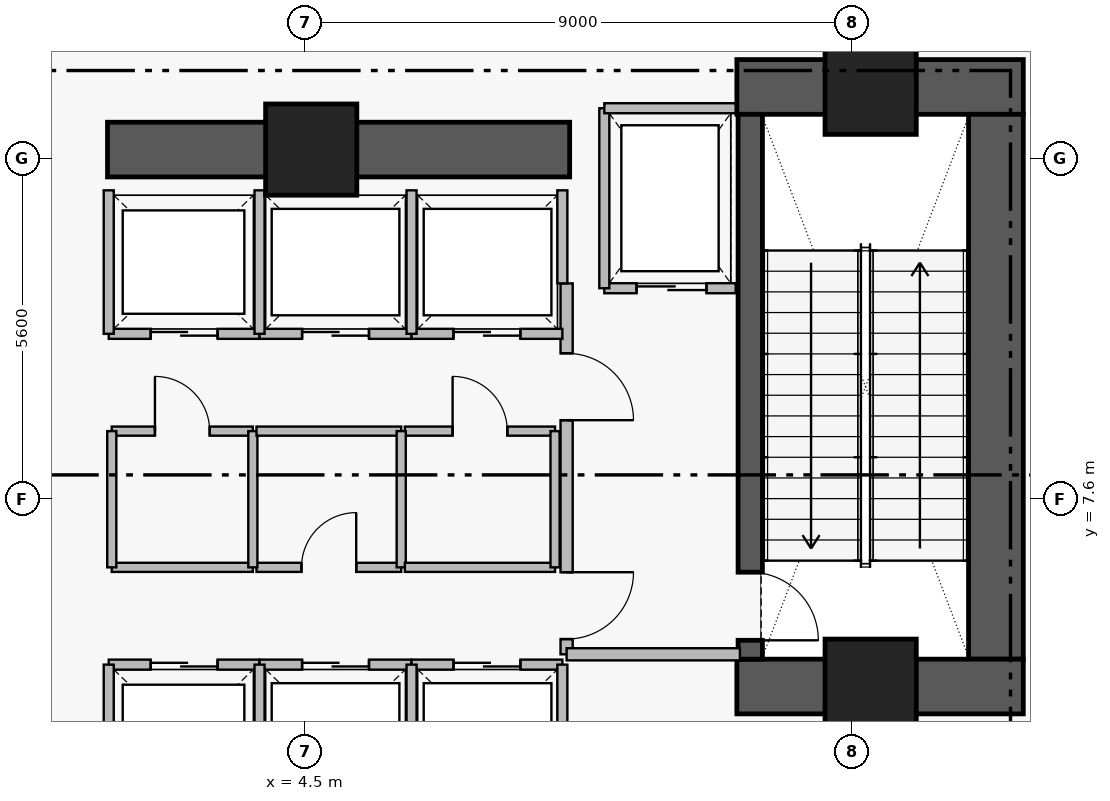
"""IFC4 building model, lengths in metres.
Left out: names, types, materials, properties, quantities, classifications, styles, units other than length and angle.
Written with IfcOpenShell. Run it as: python <this file> out.ifc"""

import sys

from ifc_helpers import new_model, si_unit, direction, frame, frame_2d, origin, origin_2d, place, context, subcontext, project, spatial, rectangle, extrude, element, fill, save


model = new_model("IFC4")
c1 = context("Model", 3, precision=1e-05, world=origin(), true_north=direction((0.0, 1.0)))
c2 = subcontext(c1, "Body", "Model", "MODEL_VIEW")
j1 = project(units=[si_unit("LENGTHUNIT", "METRE"), si_unit("PLANEANGLEUNIT", "RADIAN")], contexts=[c1])
p1 = place(None, origin())
s1 = spatial("IfcSite", under=j1, at=p1, CompositionType="ELEMENT")
p2 = place(p1, origin())
s2 = spatial("IfcBuilding", under=s1, at=p2, CompositionType="ELEMENT")
p3 = place(p2, origin())
s3 = spatial("IfcBuildingStorey", under=s2, at=p3, CompositionType="ELEMENT", Elevation=0.0)
p4 = place(p3, frame((11.6, 14.38, 0.0), z_axis=(0.0, 0.0, 1.0), x_axis=(1.0, 0.0, 0.0)))
e1 = element("IfcWall", 1, at=p4, inside=s3, PredefinedType="SHEAR", context=c2, shape_type="SweptSolid", body=[
    extrude(rectangle(XDim=4.71, YDim=0.9, at=frame_2d((2.355, 0.0))), origin(), (0.0, 0.0, 1.0), 5.81),
])
p5 = place(p3, frame((15.86, 4.97, 0.0), z_axis=(0.0, 0.0, 1.0), x_axis=(0.0, 1.0, 0.0)))
e2 = element("IfcWall", 2, at=p5, inside=s3, PredefinedType="SHEAR", context=c2, shape_type="SweptSolid", body=[
    extrude(rectangle(XDim=8.96, YDim=0.9, at=frame_2d((4.48, 0.0))), origin(), (0.0, 0.0, 1.0), 5.81),
])
p6 = place(p3, frame((11.6, 4.52, 0.0), z_axis=(0.0, 0.0, 1.0), x_axis=(1.0, 0.0, 0.0)))
e3 = element("IfcWall", 3, at=p6, inside=s3, PredefinedType="SHEAR", context=c2, shape_type="SweptSolid", body=[
    extrude(rectangle(XDim=4.71, YDim=0.9, at=frame_2d((2.355, 0.0))), origin(), (0.0, 0.0, 1.0), 5.81),
])
p7 = place(p3, frame((1.25, 13.35, 0.0), z_axis=(0.0, 0.0, 1.0), x_axis=(1.0, 0.0, 0.0)))
e4 = element("IfcWall", 4, at=p7, inside=s3, PredefinedType="SHEAR", context=c2, shape_type="SweptSolid", body=[
    extrude(rectangle(XDim=7.6, YDim=0.9, at=frame_2d((3.8, 0.0))), origin(), (0.0, 0.0, 1.0), 5.75),
])
p8 = place(p3, frame((11.82, 13.93, 0.0), z_axis=(0.0, 0.0, 1.0), x_axis=(0.0, -1.0, 0.0)))
e5 = element("IfcWall", 5, at=p8, inside=s3, PredefinedType="SHEAR", context=c2, shape_type="SweptSolid", body=[
    extrude(rectangle(XDim=8.96, YDim=0.4, at=frame_2d((4.48, 0.0))), origin(), (0.0, 0.0, 1.0), 5.81),
])
p9 = place(p8, frame((7.53, 0.0, 0.0)))
e6 = element("IfcOpeningElement", 6, at=p9, cuts=e5, PredefinedType="OPENING", context=c2, shape_type="SweptSolid", body=[
    extrude(rectangle(XDim=1.12, YDim=2.22, at=frame_2d((0.56, 1.11))), frame((0.0, 0.21, 0.0), z_axis=(0.0, -1.0, 0.0), x_axis=(1.0, 0.0, 0.0)), (0.0, 0.0, 1.0), 0.42),
])
for number, where, z_axis, x_axis in (
    (7, (4.6, 13.35, 0.0), (0.0, 0.0, 1.0), (1.0, 0.0, 0.0)),
    (8, (13.8, 14.35, 0.0), (0.0, 0.0, 1.0), (1.0, 0.0, 0.0)),
    (9, (13.8, 4.55, 0.0), (0.0, 0.0, 1.0), (1.0, 0.0, 0.0)),
):
    element("IfcColumn", number, at=place(p3, frame(where, z_axis=z_axis, x_axis=x_axis)), inside=s3, PredefinedType="COLUMN", context=c2, shape_type="SweptSolid", body=[
        extrude(rectangle(XDim=1.5, YDim=1.5, at=origin_2d()), origin(), (0.0, 0.0, 1.0), 6.0),
    ])
p10 = place(p3, frame((8.8, 11.15, 0.0), z_axis=(0.0, 0.0, 1.0), x_axis=(0.0, -1.0, 0.0)))
e10 = element("IfcWall", 10, at=p10, inside=s3, PredefinedType="PARTITIONING", context=c2, shape_type="SweptSolid", body=[
    extrude(rectangle(XDim=6.1, YDim=0.2, at=frame_2d((3.05, 0.0))), origin(), (0.0, 0.0, 1.0), 5.75),
])
p11 = place(p10, frame((1.15, 0.0, 0.0)))
e11 = element("IfcOpeningElement", 11, at=p11, cuts=e10, PredefinedType="OPENING", context=c2, shape_type="SweptSolid", body=[
    extrude(rectangle(XDim=1.1, YDim=2.2, at=frame_2d((0.55, 1.1))), frame((0.0, 0.11, 0.0), z_axis=(0.0, -1.0, 0.0), x_axis=(1.0, 0.0, 0.0)), (0.0, 0.0, 1.0), 0.22),
])
p12 = place(p10, frame((4.75, 0.0, 0.0)))
e12 = element("IfcOpeningElement", 12, at=p12, cuts=e10, PredefinedType="OPENING", context=c2, shape_type="SweptSolid", body=[
    extrude(rectangle(XDim=1.1, YDim=2.2, at=frame_2d((0.55, 1.1))), frame((0.0, 0.11, 0.0), z_axis=(0.0, -1.0, 0.0), x_axis=(1.0, 0.0, 0.0)), (0.0, 0.0, 1.0), 0.22),
])
p13 = place(p3, frame((9.42, 11.07, 0.0), z_axis=(0.0, 0.0, 1.0), x_axis=(1.0, 0.0, 0.0)))
e13 = element("IfcWall", 13, at=p13, inside=s3, PredefinedType="PARTITIONING", context=c2, shape_type="SweptSolid", body=[
    extrude(rectangle(XDim=2.16, YDim=0.165, at=frame_2d((1.08, 0.0))), origin(), (0.0, 0.0, 1.0), 5.75),
])
p14 = place(p13, frame((0.53, 0.0, 0.0)))
e14 = element("IfcOpeningElement", 14, at=p14, cuts=e13, PredefinedType="OPENING", context=c2, shape_type="SweptSolid", body=[
    extrude(rectangle(XDim=1.15, YDim=2.25, at=frame_2d((0.575, 1.125))), frame((0.0, 0.093, 0.0), z_axis=(0.0, -1.0, 0.0), x_axis=(1.0, 0.0, 0.0)), (0.0, 0.0, 1.0), 0.185),
])
p15 = place(p3, frame((1.27, 4.88, 0.0), z_axis=(0.0, 0.0, 1.0), x_axis=(1.0, 0.0, 0.0)))
e15 = element("IfcWall", 15, at=p15, inside=s3, PredefinedType="PARTITIONING", context=c2, shape_type="SweptSolid", body=[
    extrude(rectangle(XDim=2.48, YDim=0.165, at=frame_2d((1.24, 0.0))), origin(), (0.0, 0.0, 1.0), 5.75),
])
p16 = place(p15, frame((0.69, 0.0, 0.0)))
e16 = element("IfcOpeningElement", 16, at=p16, cuts=e15, PredefinedType="OPENING", context=c2, shape_type="SweptSolid", body=[
    extrude(rectangle(XDim=1.1, YDim=2.25, at=frame_2d((0.55, 1.125))), frame((0.0, 0.093, 0.0), z_axis=(0.0, -1.0, 0.0), x_axis=(1.0, 0.0, 0.0)), (0.0, 0.0, 1.0), 0.185),
])
p17 = place(p3, frame((1.27, 10.32, 0.0), z_axis=(0.0, 0.0, 1.0), x_axis=(1.0, 0.0, 0.0)))
e17 = element("IfcWall", 17, at=p17, inside=s3, PredefinedType="PARTITIONING", context=c2, shape_type="SweptSolid", body=[
    extrude(rectangle(XDim=2.48, YDim=0.165, at=frame_2d((1.24, 0.0))), origin(), (0.0, 0.0, 1.0), 5.75),
])
p18 = place(p17, frame((0.69, 0.0, 0.0)))
e18 = element("IfcOpeningElement", 18, at=p18, cuts=e17, PredefinedType="OPENING", context=c2, shape_type="SweptSolid", body=[
    extrude(rectangle(XDim=1.1, YDim=2.25, at=frame_2d((0.55, 1.125))), frame((0.0, 0.093, 0.0), z_axis=(0.0, -1.0, 0.0), x_axis=(1.0, 0.0, 0.0)), (0.0, 0.0, 1.0), 0.185),
])
p19 = place(p3, frame((3.75, 4.88, 0.0), z_axis=(0.0, 0.0, 1.0), x_axis=(1.0, 0.0, 0.0)))
e19 = element("IfcWall", 19, at=p19, inside=s3, PredefinedType="PARTITIONING", context=c2, shape_type="SweptSolid", body=[
    extrude(rectangle(XDim=2.5, YDim=0.165, at=frame_2d((1.25, 0.0))), origin(), (0.0, 0.0, 1.0), 5.75),
])
p20 = place(p19, frame((0.7, 0.0, 0.0)))
e20 = element("IfcOpeningElement", 20, at=p20, cuts=e19, PredefinedType="OPENING", context=c2, shape_type="SweptSolid", body=[
    extrude(rectangle(XDim=1.1, YDim=2.25, at=frame_2d((0.55, 1.125))), frame((0.0, 0.093, 0.0), z_axis=(0.0, -1.0, 0.0), x_axis=(1.0, 0.0, 0.0)), (0.0, 0.0, 1.0), 0.185),
])
p21 = place(p3, frame((6.25, 4.88, 0.0), z_axis=(0.0, 0.0, 1.0), x_axis=(1.0, 0.0, 0.0)))
e21 = element("IfcWall", 21, at=p21, inside=s3, PredefinedType="PARTITIONING", context=c2, shape_type="SweptSolid", body=[
    extrude(rectangle(XDim=2.48, YDim=0.165, at=frame_2d((1.24, 0.0))), origin(), (0.0, 0.0, 1.0), 5.75),
])
p22 = place(p21, frame((0.69, 0.0, 0.0)))
e22 = element("IfcOpeningElement", 22, at=p22, cuts=e21, PredefinedType="OPENING", context=c2, shape_type="SweptSolid", body=[
    extrude(rectangle(XDim=1.1, YDim=2.25, at=frame_2d((0.55, 1.125))), frame((0.0, 0.093, 0.0), z_axis=(0.0, -1.0, 0.0), x_axis=(1.0, 0.0, 0.0)), (0.0, 0.0, 1.0), 0.185),
])
p23 = place(p3, frame((3.75, 10.32, 0.0), z_axis=(0.0, 0.0, 1.0), x_axis=(1.0, 0.0, 0.0)))
e23 = element("IfcWall", 23, at=p23, inside=s3, PredefinedType="PARTITIONING", context=c2, shape_type="SweptSolid", body=[
    extrude(rectangle(XDim=2.5, YDim=0.165, at=frame_2d((1.25, 0.0))), origin(), (0.0, 0.0, 1.0), 5.75),
])
p24 = place(p23, frame((0.7, 0.0, 0.0)))
e24 = element("IfcOpeningElement", 24, at=p24, cuts=e23, PredefinedType="OPENING", context=c2, shape_type="SweptSolid", body=[
    extrude(rectangle(XDim=1.1, YDim=2.25, at=frame_2d((0.55, 1.125))), frame((0.0, 0.093, 0.0), z_axis=(0.0, -1.0, 0.0), x_axis=(1.0, 0.0, 0.0)), (0.0, 0.0, 1.0), 0.185),
])
p25 = place(p3, frame((6.25, 10.32, 0.0), z_axis=(0.0, 0.0, 1.0), x_axis=(1.0, 0.0, 0.0)))
e25 = element("IfcWall", 25, at=p25, inside=s3, PredefinedType="PARTITIONING", context=c2, shape_type="SweptSolid", body=[
    extrude(rectangle(XDim=2.48, YDim=0.165, at=frame_2d((1.24, 0.0))), origin(), (0.0, 0.0, 1.0), 5.75),
])
p26 = place(p25, frame((0.69, 0.0, 0.0)))
e26 = element("IfcOpeningElement", 26, at=p26, cuts=e25, PredefinedType="OPENING", context=c2, shape_type="SweptSolid", body=[
    extrude(rectangle(XDim=1.1, YDim=2.25, at=frame_2d((0.55, 1.125))), frame((0.0, 0.093, 0.0), z_axis=(0.0, -1.0, 0.0), x_axis=(1.0, 0.0, 0.0)), (0.0, 0.0, 1.0), 0.185),
])
p27 = place(p3, frame((1.32, 8.72, 0.0), z_axis=(0.0, 0.0, 1.0), x_axis=(1.0, 0.0, 0.0)))
e27 = element("IfcWall", 27, at=p27, inside=s3, PredefinedType="PARTITIONING", context=c2, shape_type="SweptSolid", body=[
    extrude(rectangle(XDim=2.32, YDim=0.15, at=frame_2d((1.16, 0.0))), origin(), (0.0, 0.0, 1.0), 5.75),
])
p28 = place(p27, frame((0.71, 0.0, 0.0)))
e28 = element("IfcOpeningElement", 28, at=p28, cuts=e27, PredefinedType="OPENING", context=c2, shape_type="SweptSolid", body=[
    extrude(rectangle(XDim=0.9, YDim=2.15, at=frame_2d((0.45, 1.075))), frame((0.0, 0.085, 0.0), z_axis=(0.0, -1.0, 0.0), x_axis=(1.0, 0.0, 0.0)), (0.0, 0.0, 1.0), 0.17),
])
p29 = place(p3, frame((3.7, 6.48, 0.0), z_axis=(0.0, 0.0, 1.0), x_axis=(1.0, 0.0, 0.0)))
e29 = element("IfcWall", 29, at=p29, inside=s3, PredefinedType="PARTITIONING", context=c2, shape_type="SweptSolid", body=[
    extrude(rectangle(XDim=2.38, YDim=0.15, at=frame_2d((1.19, 0.0))), origin(), (0.0, 0.0, 1.0), 5.75),
])
p30 = place(p29, frame((0.74, 0.0, 0.0)))
e30 = element("IfcOpeningElement", 30, at=p30, cuts=e29, PredefinedType="OPENING", context=c2, shape_type="SweptSolid", body=[
    extrude(rectangle(XDim=0.9, YDim=2.15, at=frame_2d((0.45, 1.075))), frame((0.0, 0.085, 0.0), z_axis=(0.0, -1.0, 0.0), x_axis=(1.0, 0.0, 0.0)), (0.0, 0.0, 1.0), 0.17),
])
p31 = place(p3, frame((6.14, 8.72, 0.0), z_axis=(0.0, 0.0, 1.0), x_axis=(1.0, 0.0, 0.0)))
e31 = element("IfcWall", 31, at=p31, inside=s3, PredefinedType="PARTITIONING", context=c2, shape_type="SweptSolid", body=[
    extrude(rectangle(XDim=2.47, YDim=0.15, at=frame_2d((1.235, 0.0))), origin(), (0.0, 0.0, 1.0), 5.75),
])
p32 = place(p31, frame((0.785, 0.0, 0.0)))
e32 = element("IfcOpeningElement", 32, at=p32, cuts=e31, PredefinedType="OPENING", context=c2, shape_type="SweptSolid", body=[
    extrude(rectangle(XDim=0.9, YDim=2.15, at=frame_2d((0.45, 1.075))), frame((0.0, 0.085, 0.0), z_axis=(0.0, -1.0, 0.0), x_axis=(1.0, 0.0, 0.0)), (0.0, 0.0, 1.0), 0.17),
])
p33 = place(p3, frame((8.8, 5.05, 0.0), z_axis=(0.0, 0.0, 1.0), x_axis=(1.0, 0.0, 0.0)))
e33 = element("IfcWall", 33, at=p33, inside=s3, PredefinedType="PARTITIONING", context=c2, shape_type="SweptSolid", body=[
    extrude(rectangle(XDim=2.85, YDim=0.2, at=frame_2d((1.425, 0.0))), origin(), (0.0, 0.0, 1.0), 5.75),
])
p34 = place(p3, frame((9.42, 11.07, 0.0), z_axis=(0.0, 0.0, 1.0), x_axis=(0.0, 1.0, 0.0)))
e34 = element("IfcWall", 34, at=p34, inside=s3, PredefinedType="PARTITIONING", context=c2, shape_type="SweptSolid", body=[
    extrude(rectangle(XDim=2.96, YDim=0.165, at=frame_2d((1.48, 0.0))), origin(), (0.0, 0.0, 1.0), 5.75),
])
p35 = place(p3, frame((9.42, 14.03, 0.0), z_axis=(0.0, 0.0, 1.0), x_axis=(1.0, 0.0, 0.0)))
e35 = element("IfcWall", 35, at=p35, inside=s3, PredefinedType="PARTITIONING", context=c2, shape_type="SweptSolid", body=[
    extrude(rectangle(XDim=2.16, YDim=0.165, at=frame_2d((1.08, 0.0))), origin(), (0.0, 0.0, 1.0), 5.75),
])
for number, where, z_axis, x_axis in (
    (36, (1.27, 2.52, 0.0), (0.0, 0.0, 1.0), (0.0, 1.0, 0.0)),
    (37, (3.75, 2.52, 0.0), (0.0, 0.0, 1.0), (0.0, 1.0, 0.0)),
    (38, (1.27, 10.32, 0.0), (0.0, 0.0, 1.0), (0.0, 1.0, 0.0)),
    (39, (3.75, 10.32, 0.0), (0.0, 0.0, 1.0), (0.0, 1.0, 0.0)),
    (40, (6.25, 2.52, 0.0), (0.0, 0.0, 1.0), (0.0, 1.0, 0.0)),
    (41, (8.73, 2.52, 0.0), (0.0, 0.0, 1.0), (0.0, 1.0, 0.0)),
    (42, (6.25, 10.32, 0.0), (0.0, 0.0, 1.0), (0.0, 1.0, 0.0)),
):
    element("IfcWall", number, at=place(p3, frame(where, z_axis=z_axis, x_axis=x_axis)), inside=s3, PredefinedType="PARTITIONING", context=c2, shape_type="SweptSolid", body=[
        extrude(rectangle(XDim=2.36, YDim=0.165, at=frame_2d((1.18, 0.0))), origin(), (0.0, 0.0, 1.0), 5.75),
    ])
p36 = place(p3, frame((8.73, 11.15, 0.0), z_axis=(0.0, 0.0, 1.0), x_axis=(0.0, 1.0, 0.0)))
e43 = element("IfcWall", 43, at=p36, inside=s3, PredefinedType="PARTITIONING", context=c2, shape_type="SweptSolid", body=[
    extrude(rectangle(XDim=1.53, YDim=0.165, at=frame_2d((0.765, 0.0))), origin(), (0.0, 0.0, 1.0), 5.75),
])
p37 = place(p3, frame((1.32, 6.48, 0.0), z_axis=(0.0, 0.0, 1.0), x_axis=(1.0, 0.0, 0.0)))
e44 = element("IfcWall", 44, at=p37, inside=s3, PredefinedType="PARTITIONING", context=c2, shape_type="SweptSolid", body=[
    extrude(rectangle(XDim=2.32, YDim=0.15, at=frame_2d((1.16, 0.0))), origin(), (0.0, 0.0, 1.0), 5.75),
])
for number, where, z_axis, x_axis in (
    (45, (1.32, 6.48, 0.0), (0.0, 0.0, 1.0), (0.0, 1.0, 0.0)),
    (46, (3.64, 6.48, 0.0), (0.0, 0.0, 1.0), (0.0, 1.0, 0.0)),
):
    element("IfcWall", number, at=place(p3, frame(where, z_axis=z_axis, x_axis=x_axis)), inside=s3, PredefinedType="PARTITIONING", context=c2, shape_type="SweptSolid", body=[
        extrude(rectangle(XDim=2.24, YDim=0.15, at=frame_2d((1.12, 0.0))), origin(), (0.0, 0.0, 1.0), 5.75),
    ])
p38 = place(p3, frame((3.7, 8.72, 0.0), z_axis=(0.0, 0.0, 1.0), x_axis=(1.0, 0.0, 0.0)))
e47 = element("IfcWall", 47, at=p38, inside=s3, PredefinedType="PARTITIONING", context=c2, shape_type="SweptSolid", body=[
    extrude(rectangle(XDim=2.38, YDim=0.15, at=frame_2d((1.19, 0.0))), origin(), (0.0, 0.0, 1.0), 5.75),
])
p39 = place(p3, frame((6.08, 6.48, 0.0), z_axis=(0.0, 0.0, 1.0), x_axis=(0.0, 1.0, 0.0)))
e48 = element("IfcWall", 48, at=p39, inside=s3, PredefinedType="PARTITIONING", context=c2, shape_type="SweptSolid", body=[
    extrude(rectangle(XDim=2.24, YDim=0.15, at=frame_2d((1.12, 0.0))), origin(), (0.0, 0.0, 1.0), 5.75),
])
p40 = place(p3, frame((6.14, 6.48, 0.0), z_axis=(0.0, 0.0, 1.0), x_axis=(1.0, 0.0, 0.0)))
e49 = element("IfcWall", 49, at=p40, inside=s3, PredefinedType="PARTITIONING", context=c2, shape_type="SweptSolid", body=[
    extrude(rectangle(XDim=2.47, YDim=0.15, at=frame_2d((1.235, 0.0))), origin(), (0.0, 0.0, 1.0), 5.75),
])
p41 = place(p3, frame((8.61, 6.48, 0.0), z_axis=(0.0, 0.0, 1.0), x_axis=(0.0, 1.0, 0.0)))
e50 = element("IfcWall", 50, at=p41, inside=s3, PredefinedType="PARTITIONING", context=c2, shape_type="SweptSolid", body=[
    extrude(rectangle(XDim=2.24, YDim=0.15, at=frame_2d((1.12, 0.0))), origin(), (0.0, 0.0, 1.0), 5.75),
])
p42 = place(p9, origin())
e51 = element("IfcDoor", 51, at=p42, inside=s3, OperationType="SINGLE_SWING_RIGHT", PredefinedType="DOOR", context=c2, shape_type="SweptSolid", body=[
    extrude(rectangle(XDim=1.12, YDim=2.22, at=frame_2d((0.56, 1.11))), frame((0.0, 0.025, 0.0), z_axis=(0.0, -1.0, 0.0), x_axis=(1.0, 0.0, 0.0)), (0.0, 0.0, 1.0), 0.05),
])
fill(e6, e51)
p43 = place(p11, origin())
e52 = element("IfcDoor", 52, at=p43, inside=s3, OperationType="SINGLE_SWING_RIGHT", PredefinedType="DOOR", context=c2, shape_type="SweptSolid", body=[
    extrude(rectangle(XDim=1.1, YDim=2.2, at=frame_2d((0.55, 1.1))), frame((0.0, 0.025, 0.0), z_axis=(0.0, -1.0, 0.0), x_axis=(1.0, 0.0, 0.0)), (0.0, 0.0, 1.0), 0.05),
])
fill(e11, e52)
p44 = place(p12, origin())
e53 = element("IfcDoor", 53, at=p44, inside=s3, OperationType="SINGLE_SWING_LEFT", PredefinedType="DOOR", context=c2, shape_type="SweptSolid", body=[
    extrude(rectangle(XDim=1.1, YDim=2.2, at=frame_2d((0.55, 1.1))), frame((0.0, 0.025, 0.0), z_axis=(0.0, -1.0, 0.0), x_axis=(1.0, 0.0, 0.0)), (0.0, 0.0, 1.0), 0.05),
])
fill(e12, e53)
p45 = place(p14, origin())
e54 = element("IfcDoor", 54, at=p45, inside=s3, OperationType="SLIDING_TO_LEFT", PredefinedType="DOOR", context=c2, shape_type="SweptSolid", body=[
    extrude(rectangle(XDim=1.15, YDim=2.25, at=frame_2d((0.575, 1.125))), frame((0.0, 0.025, 0.0), z_axis=(0.0, -1.0, 0.0), x_axis=(1.0, 0.0, 0.0)), (0.0, 0.0, 1.0), 0.05),
])
fill(e14, e54)
p46 = place(p16, origin())
e55 = element("IfcDoor", 55, at=p46, inside=s3, OperationType="SLIDING_TO_LEFT", PredefinedType="DOOR", context=c2, shape_type="SweptSolid", body=[
    extrude(rectangle(XDim=1.1, YDim=2.25, at=frame_2d((0.55, 1.125))), frame((0.0, 0.025, 0.0), z_axis=(0.0, -1.0, 0.0), x_axis=(1.0, 0.0, 0.0)), (0.0, 0.0, 1.0), 0.05),
])
fill(e16, e55)
p47 = place(p18, origin())
e56 = element("IfcDoor", 56, at=p47, inside=s3, OperationType="SLIDING_TO_LEFT", PredefinedType="DOOR", context=c2, shape_type="SweptSolid", body=[
    extrude(rectangle(XDim=1.1, YDim=2.25, at=frame_2d((0.55, 1.125))), frame((0.0, 0.025, 0.0), z_axis=(0.0, -1.0, 0.0), x_axis=(1.0, 0.0, 0.0)), (0.0, 0.0, 1.0), 0.05),
])
fill(e18, e56)
p48 = place(p20, origin())
e57 = element("IfcDoor", 57, at=p48, inside=s3, OperationType="SLIDING_TO_LEFT", PredefinedType="DOOR", context=c2, shape_type="SweptSolid", body=[
    extrude(rectangle(XDim=1.1, YDim=2.25, at=frame_2d((0.55, 1.125))), frame((0.0, 0.025, 0.0), z_axis=(0.0, -1.0, 0.0), x_axis=(1.0, 0.0, 0.0)), (0.0, 0.0, 1.0), 0.05),
])
fill(e20, e57)
p49 = place(p22, origin())
e58 = element("IfcDoor", 58, at=p49, inside=s3, OperationType="SLIDING_TO_LEFT", PredefinedType="DOOR", context=c2, shape_type="SweptSolid", body=[
    extrude(rectangle(XDim=1.1, YDim=2.25, at=frame_2d((0.55, 1.125))), frame((0.0, 0.025, 0.0), z_axis=(0.0, -1.0, 0.0), x_axis=(1.0, 0.0, 0.0)), (0.0, 0.0, 1.0), 0.05),
])
fill(e22, e58)
p50 = place(p24, origin())
e59 = element("IfcDoor", 59, at=p50, inside=s3, OperationType="SLIDING_TO_LEFT", PredefinedType="DOOR", context=c2, shape_type="SweptSolid", body=[
    extrude(rectangle(XDim=1.1, YDim=2.25, at=frame_2d((0.55, 1.125))), frame((0.0, 0.025, 0.0), z_axis=(0.0, -1.0, 0.0), x_axis=(1.0, 0.0, 0.0)), (0.0, 0.0, 1.0), 0.05),
])
fill(e24, e59)
p51 = place(p26, origin())
e60 = element("IfcDoor", 60, at=p51, inside=s3, OperationType="SLIDING_TO_LEFT", PredefinedType="DOOR", context=c2, shape_type="SweptSolid", body=[
    extrude(rectangle(XDim=1.1, YDim=2.25, at=frame_2d((0.55, 1.125))), frame((0.0, 0.025, 0.0), z_axis=(0.0, -1.0, 0.0), x_axis=(1.0, 0.0, 0.0)), (0.0, 0.0, 1.0), 0.05),
])
fill(e26, e60)
p52 = place(p28, origin())
e61 = element("IfcDoor", 61, at=p52, inside=s3, OperationType="SINGLE_SWING_LEFT", PredefinedType="DOOR", context=c2, shape_type="SweptSolid", body=[
    extrude(rectangle(XDim=0.9, YDim=2.15, at=frame_2d((0.45, 1.075))), frame((0.0, 0.025, 0.0), z_axis=(0.0, -1.0, 0.0), x_axis=(1.0, 0.0, 0.0)), (0.0, 0.0, 1.0), 0.05),
])
fill(e28, e61)
p53 = place(p30, origin())
e62 = element("IfcDoor", 62, at=p53, inside=s3, OperationType="SINGLE_SWING_RIGHT", PredefinedType="DOOR", context=c2, shape_type="SweptSolid", body=[
    extrude(rectangle(XDim=0.9, YDim=2.15, at=frame_2d((0.45, 1.075))), frame((0.0, 0.025, 0.0), z_axis=(0.0, -1.0, 0.0), x_axis=(1.0, 0.0, 0.0)), (0.0, 0.0, 1.0), 0.05),
])
fill(e30, e62)
p54 = place(p32, origin())
e63 = element("IfcDoor", 63, at=p54, inside=s3, OperationType="SINGLE_SWING_LEFT", PredefinedType="DOOR", context=c2, shape_type="SweptSolid", body=[
    extrude(rectangle(XDim=0.9, YDim=2.15, at=frame_2d((0.45, 1.075))), frame((0.0, 0.025, 0.0), z_axis=(0.0, -1.0, 0.0), x_axis=(1.0, 0.0, 0.0)), (0.0, 0.0, 1.0), 0.05),
])
fill(e32, e63)
save(model, sys.argv[1])
